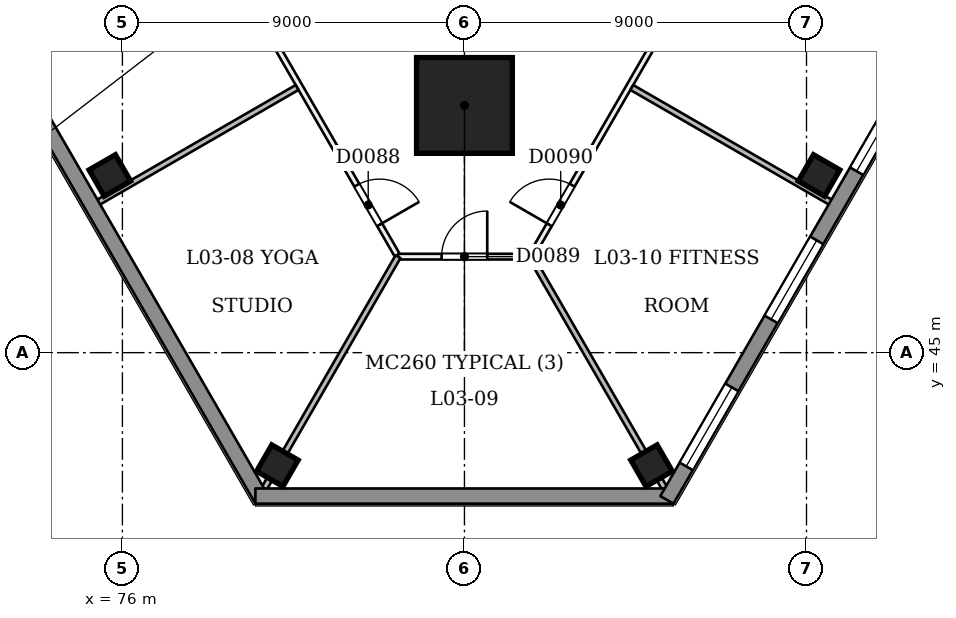
"""IFC4 building model, lengths in metres.
Left out: names, types, materials, properties, quantities, classifications, styles, units other than length and angle.
Written with IfcOpenShell. Run it as: python <this file> out.ifc"""

import sys

from ifc_helpers import new_model, si_unit, direction, frame, frame_2d, origin, origin_2d, place, context, subcontext, project, spatial, rectangle, extrude, element, fill, save


model = new_model("IFC4")
c1 = context("Model", 3, precision=1e-05, world=origin(), true_north=direction((0.0, 1.0)))
c2 = subcontext(c1, "Body", "Model", "MODEL_VIEW")
j1 = project(units=[si_unit("LENGTHUNIT", "METRE"), si_unit("PLANEANGLEUNIT", "RADIAN")], contexts=[c1])
p1 = place(None, origin())
s1 = spatial("IfcSite", under=j1, at=p1, CompositionType="ELEMENT")
p2 = place(p1, origin())
s2 = spatial("IfcBuilding", under=s1, at=p2, CompositionType="ELEMENT")
p3 = place(p2, frame((0.0, 0.0, 18.0)))
s3 = spatial("IfcBuildingStorey", under=s2, at=p3, CompositionType="ELEMENT", Elevation=18.0)
p4 = place(p3, frame((85.0, 51.434, 0.0), z_axis=(0.0, 0.058385473851, 0.998294113197), x_axis=(-1.0, 0.0, 0.0)))
e1 = element("IfcColumn", 1, at=p4, inside=s3, PredefinedType="COLUMN", context=c2, shape_type="SweptSolid", body=[
    extrude(rectangle(XDim=2.52, YDim=2.52, at=origin_2d()), origin(), (0.0, 0.0, 1.0), 4.508),
])
for number, where, z_axis, x_axis in (
    (2, (75.669, 49.662, 0.0), (0.0, 0.0, 1.0), (0.866, 0.5, 0.0)),
    (3, (80.077, 42.026, 0.0), (0.0, 0.0, 1.0), (0.5, 0.866, 0.0)),
    (4, (89.923, 42.026, 0.0), (0.0, 0.0, 1.0), (0.866, 0.5, 0.0)),
    (5, (94.331, 49.662, 0.0), (0.0, 0.0, 1.0), (0.5, 0.866, 0.0)),
):
    element("IfcColumn", number, at=place(p3, frame(where, z_axis=z_axis, x_axis=x_axis)), inside=s3, PredefinedType="COLUMN", context=c2, shape_type="SweptSolid", body=[
        extrude(rectangle(XDim=0.8, YDim=0.8, at=origin_2d()), origin(), (0.0, 0.0, 1.0), 4.5),
    ])
p5 = place(p3, frame((55.57, 95.474, 0.0), z_axis=(0.0, 0.0, 1.0), x_axis=(0.500000085768, -0.866025354266, 0.0)))
e6 = element("IfcWall", 6, at=p5, inside=s3, PredefinedType="PARTITIONING", context=c2, shape_type="SweptSolid", body=[
    extrude(rectangle(XDim=55.365, YDim=0.15, at=frame_2d((27.682, 0.0))), origin(), (0.0, 0.0, 1.0), 3.55),
])
p6 = place(p5, frame((9.082, 0.0, 0.0)))
e7 = element("IfcOpeningElement", 7, at=p6, cuts=e6, PredefinedType="OPENING", context=c2, shape_type="SweptSolid", body=[
    extrude(rectangle(XDim=1.2, YDim=2.1, at=frame_2d((0.6, 1.05))), frame((0.0, 0.085, 0.0), z_axis=(0.0, -1.0, 0.0), x_axis=(1.0, 0.0, 0.0)), (0.0, 0.0, 1.0), 0.171),
])
p7 = place(p5, frame((18.906, 0.0, 0.0)))
e8 = element("IfcOpeningElement", 8, at=p7, cuts=e6, PredefinedType="OPENING", context=c2, shape_type="SweptSolid", body=[
    extrude(rectangle(XDim=0.9, YDim=2.1, at=frame_2d((0.45, 1.05))), frame((0.0, 0.085, 0.0), z_axis=(0.0, -1.0, 0.0), x_axis=(1.0, 0.0, 0.0)), (0.0, 0.0, 1.0), 0.171),
])
p8 = place(p5, frame((21.856, 0.0, 0.0)))
e9 = element("IfcOpeningElement", 9, at=p8, cuts=e6, PredefinedType="OPENING", context=c2, shape_type="SweptSolid", body=[
    extrude(rectangle(XDim=0.9, YDim=2.1, at=frame_2d((0.45, 1.05))), frame((0.0, 0.085, 0.0), z_axis=(0.0, -1.0, 0.0), x_axis=(1.0, 0.0, 0.0)), (0.0, 0.0, 1.0), 0.171),
])
p9 = place(p5, frame((31.582, 0.0, 0.0)))
e10 = element("IfcOpeningElement", 10, at=p9, cuts=e6, PredefinedType="OPENING", context=c2, shape_type="SweptSolid", body=[
    extrude(rectangle(XDim=1.2, YDim=2.1, at=frame_2d((0.6, 1.05))), frame((0.0, 0.085, 0.0), z_axis=(0.0, -1.0, 0.0), x_axis=(1.0, 0.0, 0.0)), (0.0, 0.0, 1.0), 0.171),
])
p10 = place(p5, frame((45.082, 0.0, 0.0)))
e11 = element("IfcOpeningElement", 11, at=p10, cuts=e6, PredefinedType="OPENING", context=c2, shape_type="SweptSolid", body=[
    extrude(rectangle(XDim=1.2, YDim=2.1, at=frame_2d((0.6, 1.05))), frame((0.0, 0.085, 0.0), z_axis=(0.0, -1.0, 0.0), x_axis=(1.0, 0.0, 0.0)), (0.0, 0.0, 1.0), 0.171),
])
p11 = place(p5, frame((53.195, 0.0, 0.0)))
e12 = element("IfcOpeningElement", 12, at=p11, cuts=e6, PredefinedType="OPENING", context=c2, shape_type="SweptSolid", body=[
    extrude(rectangle(XDim=1.2, YDim=2.1, at=frame_2d((0.6, 1.05))), frame((0.0, 0.085, 0.0), z_axis=(0.0, -1.0, 0.0), x_axis=(1.0, 0.0, 0.0)), (0.0, 0.0, 1.0), 0.171),
])
p12 = place(p3, frame((83.253, 47.526, 0.0), z_axis=(0.0, 0.0, 1.0), x_axis=(1.0, 0.0, 0.0)))
e13 = element("IfcWall", 13, at=p12, inside=s3, PredefinedType="PARTITIONING", context=c2, shape_type="SweptSolid", body=[
    extrude(rectangle(XDim=3.495, YDim=0.15, at=frame_2d((1.747, 0.0))), origin(), (0.0, 0.0, 1.0), 4.05),
])
p13 = place(p12, frame((1.147, 0.0, 0.0)))
e14 = element("IfcOpeningElement", 14, at=p13, cuts=e13, PredefinedType="OPENING", context=c2, shape_type="SweptSolid", body=[
    extrude(rectangle(XDim=1.2, YDim=2.1, at=frame_2d((0.6, 1.05))), frame((0.0, 0.085, 0.0), z_axis=(0.0, -1.0, 0.0), x_axis=(1.0, 0.0, 0.0)), (0.0, 0.0, 1.0), 0.171),
])
p14 = place(p3, frame((86.747, 47.526, 0.0), z_axis=(0.0, 0.0, 1.0), x_axis=(0.500000085768, 0.866025354266, 0.0)))
e15 = element("IfcWall", 15, at=p14, inside=s3, PredefinedType="PARTITIONING", context=c2, shape_type="SweptSolid", body=[
    extrude(rectangle(XDim=55.365, YDim=0.15, at=frame_2d((27.682, 0.0))), origin(), (0.0, 0.0, 1.0), 3.55),
])
p15 = place(p14, frame((0.97, 0.0, 0.0)))
e16 = element("IfcOpeningElement", 16, at=p15, cuts=e15, PredefinedType="OPENING", context=c2, shape_type="SweptSolid", body=[
    extrude(rectangle(XDim=1.2, YDim=2.1, at=frame_2d((0.6, 1.05))), frame((0.0, 0.085, 0.0), z_axis=(0.0, -1.0, 0.0), x_axis=(1.0, 0.0, 0.0)), (0.0, 0.0, 1.0), 0.171),
])
p16 = place(p14, frame((11.332, 0.0, 0.0)))
e17 = element("IfcOpeningElement", 17, at=p16, cuts=e15, PredefinedType="OPENING", context=c2, shape_type="SweptSolid", body=[
    extrude(rectangle(XDim=1.2, YDim=2.1, at=frame_2d((0.6, 1.05))), frame((0.0, 0.085, 0.0), z_axis=(0.0, -1.0, 0.0), x_axis=(1.0, 0.0, 0.0)), (0.0, 0.0, 1.0), 0.171),
])
p17 = place(p14, frame((22.582, 0.0, 0.0)))
e18 = element("IfcOpeningElement", 18, at=p17, cuts=e15, PredefinedType="OPENING", context=c2, shape_type="SweptSolid", body=[
    extrude(rectangle(XDim=1.2, YDim=2.1, at=frame_2d((0.6, 1.05))), frame((0.0, 0.085, 0.0), z_axis=(0.0, -1.0, 0.0), x_axis=(1.0, 0.0, 0.0)), (0.0, 0.0, 1.0), 0.171),
])
p18 = place(p14, frame((28.365, 0.0, 0.0)))
e19 = element("IfcOpeningElement", 19, at=p18, cuts=e15, PredefinedType="OPENING", context=c2, shape_type="SweptSolid", body=[
    extrude(rectangle(XDim=1.0, YDim=2.1, at=frame_2d((0.5, 1.05))), frame((0.0, 0.085, 0.0), z_axis=(0.0, -1.0, 0.0), x_axis=(1.0, 0.0, 0.0)), (0.0, 0.0, 1.0), 0.171),
])
p19 = place(p14, frame((30.615, 0.0, 0.0)))
e20 = element("IfcOpeningElement", 20, at=p19, cuts=e15, PredefinedType="OPENING", context=c2, shape_type="SweptSolid", body=[
    extrude(rectangle(XDim=1.0, YDim=2.1, at=frame_2d((0.5, 1.05))), frame((0.0, 0.085, 0.0), z_axis=(0.0, -1.0, 0.0), x_axis=(1.0, 0.0, 0.0)), (0.0, 0.0, 1.0), 0.171),
])
p20 = place(p14, frame((38.332, 0.0, 0.0)))
e21 = element("IfcOpeningElement", 21, at=p20, cuts=e15, PredefinedType="OPENING", context=c2, shape_type="SweptSolid", body=[
    extrude(rectangle(XDim=1.2, YDim=2.1, at=frame_2d((0.6, 1.05))), frame((0.0, 0.085, 0.0), z_axis=(0.0, -1.0, 0.0), x_axis=(1.0, 0.0, 0.0)), (0.0, 0.0, 1.0), 0.171),
])
p21 = place(p14, frame((49.582, 0.0, 0.0)))
e22 = element("IfcOpeningElement", 22, at=p21, cuts=e15, PredefinedType="OPENING", context=c2, shape_type="SweptSolid", body=[
    extrude(rectangle(XDim=1.2, YDim=2.1, at=frame_2d((0.6, 1.05))), frame((0.0, 0.085, 0.0), z_axis=(0.0, -1.0, 0.0), x_axis=(1.0, 0.0, 0.0)), (0.0, 0.0, 1.0), 0.171),
])
p22 = place(p3, frame((75.119, 48.814, 0.0), z_axis=(0.0, 0.0, 1.0), x_axis=(0.866025537322, 0.499999768706, 0.0)))
e23 = element("IfcWall", 23, at=p22, inside=s3, PredefinedType="PARTITIONING", context=c2, shape_type="SweptSolid", body=[
    extrude(rectangle(XDim=6.325, YDim=0.15, at=frame_2d((3.163, 0.0))), origin(), (0.0, 0.0, 1.0), 4.05),
])
for number, where, z_axis, x_axis in (
    (24, (79.558, 41.126, 0.0), (0.0, 0.0, 1.0), (0.5, 0.866, 0.0)),
    (25, (90.442, 41.126, 0.0), (0.0, 0.0, 1.0), (-0.5, 0.866, 0.0)),
):
    element("IfcWall", number, at=place(p3, frame(where, z_axis=z_axis, x_axis=x_axis)), inside=s3, PredefinedType="PARTITIONING", context=c2, shape_type="SweptSolid", body=[
        extrude(rectangle(XDim=7.39, YDim=0.15, at=frame_2d((3.695, 0.0))), origin(), (0.0, 0.0, 1.0), 4.05),
    ])
p23 = place(p3, frame((94.881, 48.814, 0.0), z_axis=(0.0, 0.0, 1.0), x_axis=(-0.866042250622, 0.499970819286, 0.0)))
e26 = element("IfcWall", 26, at=p23, inside=s3, PredefinedType="PARTITIONING", context=c2, shape_type="SweptSolid", body=[
    extrude(rectangle(XDim=6.325, YDim=0.15, at=frame_2d((3.163, 0.0))), origin(), (0.0, 0.0, 1.0), 4.05),
])
p24 = place(p3, frame((79.673, 41.126, 0.0), z_axis=(0.0, 0.0, 1.0), x_axis=(-0.499997306052, 0.866026959131, 0.0)))
e27 = element("IfcWall", 27, at=p24, inside=s3, PredefinedType="SOLIDWALL", context=c2, shape_type="SweptSolid", body=[
    extrude(rectangle(XDim=62.87, YDim=0.4, at=frame_2d((31.435, 0.0))), origin(), (0.0, 0.0, 1.0), 3.55),
])
p25 = place(p24, frame((54.986, 0.0, 0.9)))
e28 = element("IfcOpeningElement", 28, at=p25, cuts=e27, PredefinedType="OPENING", context=c2, shape_type="SweptSolid", body=[
    extrude(rectangle(XDim=2.4, YDim=1.5, at=frame_2d((1.2, 0.75))), frame((0.0, 0.21, 0.0), z_axis=(0.0, -1.0, 0.0), x_axis=(1.0, 0.0, 0.0)), (0.0, 0.0, 1.0), 0.421),
])
p26 = place(p24, frame((50.486, 0.0, 0.9)))
e29 = element("IfcOpeningElement", 29, at=p26, cuts=e27, PredefinedType="OPENING", context=c2, shape_type="SweptSolid", body=[
    extrude(rectangle(XDim=2.4, YDim=1.5, at=frame_2d((1.2, 0.75))), frame((0.0, 0.21, 0.0), z_axis=(0.0, -1.0, 0.0), x_axis=(1.0, 0.0, 0.0)), (0.0, 0.0, 1.0), 0.421),
])
p27 = place(p24, frame((45.986, 0.0, 0.9)))
e30 = element("IfcOpeningElement", 30, at=p27, cuts=e27, PredefinedType="OPENING", context=c2, shape_type="SweptSolid", body=[
    extrude(rectangle(XDim=2.4, YDim=1.5, at=frame_2d((1.2, 0.75))), frame((0.0, 0.21, 0.0), z_axis=(0.0, -1.0, 0.0), x_axis=(1.0, 0.0, 0.0)), (0.0, 0.0, 1.0), 0.421),
])
p28 = place(p24, frame((32.486, 0.0, 0.9)))
e31 = element("IfcOpeningElement", 31, at=p28, cuts=e27, PredefinedType="OPENING", context=c2, shape_type="SweptSolid", body=[
    extrude(rectangle(XDim=2.4, YDim=1.5, at=frame_2d((1.2, 0.75))), frame((0.0, 0.21, 0.0), z_axis=(0.0, -1.0, 0.0), x_axis=(1.0, 0.0, 0.0)), (0.0, 0.0, 1.0), 0.421),
])
p29 = place(p24, frame((27.986, 0.0, 0.9)))
e32 = element("IfcOpeningElement", 32, at=p29, cuts=e27, PredefinedType="OPENING", context=c2, shape_type="SweptSolid", body=[
    extrude(rectangle(XDim=2.4, YDim=1.5, at=frame_2d((1.2, 0.75))), frame((0.0, 0.21, 0.0), z_axis=(0.0, -1.0, 0.0), x_axis=(1.0, 0.0, 0.0)), (0.0, 0.0, 1.0), 0.421),
])
p30 = place(p24, frame((23.486, 0.0, 0.9)))
e33 = element("IfcOpeningElement", 33, at=p30, cuts=e27, PredefinedType="OPENING", context=c2, shape_type="SweptSolid", body=[
    extrude(rectangle(XDim=2.4, YDim=1.5, at=frame_2d((1.2, 0.75))), frame((0.0, 0.21, 0.0), z_axis=(0.0, -1.0, 0.0), x_axis=(1.0, 0.0, 0.0)), (0.0, 0.0, 1.0), 0.421),
])
p31 = place(p24, frame((18.986, 0.0, 0.9)))
e34 = element("IfcOpeningElement", 34, at=p31, cuts=e27, PredefinedType="OPENING", context=c2, shape_type="SweptSolid", body=[
    extrude(rectangle(XDim=2.4, YDim=1.5, at=frame_2d((1.2, 0.75))), frame((0.0, 0.21, 0.0), z_axis=(0.0, -1.0, 0.0), x_axis=(1.0, 0.0, 0.0)), (0.0, 0.0, 1.0), 0.421),
])
p32 = place(p24, frame((14.486, 0.0, 0.9)))
e35 = element("IfcOpeningElement", 35, at=p32, cuts=e27, PredefinedType="OPENING", context=c2, shape_type="SweptSolid", body=[
    extrude(rectangle(XDim=2.4, YDim=1.5, at=frame_2d((1.2, 0.75))), frame((0.0, 0.21, 0.0), z_axis=(0.0, -1.0, 0.0), x_axis=(1.0, 0.0, 0.0)), (0.0, 0.0, 1.0), 0.421),
])
p33 = place(p3, frame((90.5, 41.226, 0.0), z_axis=(0.0, 0.0, 1.0), x_axis=(-1.0, 0.0, 0.0)))
e36 = element("IfcWall", 36, at=p33, inside=s3, PredefinedType="SOLIDWALL", context=c2, shape_type="SweptSolid", body=[
    extrude(rectangle(XDim=11.0, YDim=0.4, at=frame_2d((5.5, 0.0))), origin(), (0.0, 0.0, 1.0), 3.55),
])
p34 = place(p3, frame((121.762, 95.574, 0.0), z_axis=(0.0, 0.0, 1.0), x_axis=(-0.499997306052, -0.866026959131, 0.0)))
e37 = element("IfcWall", 37, at=p34, inside=s3, PredefinedType="SOLIDWALL", context=c2, shape_type="SweptSolid", body=[
    extrude(rectangle(XDim=62.87, YDim=0.4, at=frame_2d((31.435, 0.0))), origin(), (0.0, 0.0, 1.0), 3.55),
])
p35 = place(p34, frame((59.452, 0.0, 0.9)))
e38 = element("IfcOpeningElement", 38, at=p35, cuts=e37, PredefinedType="OPENING", context=c2, shape_type="SweptSolid", body=[
    extrude(rectangle(XDim=2.4, YDim=1.5, at=frame_2d((1.2, 0.75))), frame((0.0, 0.21, 0.0), z_axis=(0.0, -1.0, 0.0), x_axis=(1.0, 0.0, 0.0)), (0.0, 0.0, 1.0), 0.421),
])
p36 = place(p34, frame((54.986, 0.0, 0.9)))
e39 = element("IfcOpeningElement", 39, at=p36, cuts=e37, PredefinedType="OPENING", context=c2, shape_type="SweptSolid", body=[
    extrude(rectangle(XDim=2.4, YDim=1.5, at=frame_2d((1.2, 0.75))), frame((0.0, 0.21, 0.0), z_axis=(0.0, -1.0, 0.0), x_axis=(1.0, 0.0, 0.0)), (0.0, 0.0, 1.0), 0.421),
])
p37 = place(p34, frame((50.486, 0.0, 0.9)))
e40 = element("IfcOpeningElement", 40, at=p37, cuts=e37, PredefinedType="OPENING", context=c2, shape_type="SweptSolid", body=[
    extrude(rectangle(XDim=2.4, YDim=1.5, at=frame_2d((1.2, 0.75))), frame((0.0, 0.21, 0.0), z_axis=(0.0, -1.0, 0.0), x_axis=(1.0, 0.0, 0.0)), (0.0, 0.0, 1.0), 0.421),
])
p38 = place(p34, frame((45.986, 0.0, 0.9)))
e41 = element("IfcOpeningElement", 41, at=p38, cuts=e37, PredefinedType="OPENING", context=c2, shape_type="SweptSolid", body=[
    extrude(rectangle(XDim=2.4, YDim=1.5, at=frame_2d((1.2, 0.75))), frame((0.0, 0.21, 0.0), z_axis=(0.0, -1.0, 0.0), x_axis=(1.0, 0.0, 0.0)), (0.0, 0.0, 1.0), 0.421),
])
p39 = place(p34, frame((41.486, 0.0, 0.9)))
e42 = element("IfcOpeningElement", 42, at=p39, cuts=e37, PredefinedType="OPENING", context=c2, shape_type="SweptSolid", body=[
    extrude(rectangle(XDim=2.4, YDim=1.5, at=frame_2d((1.2, 0.75))), frame((0.0, 0.21, 0.0), z_axis=(0.0, -1.0, 0.0), x_axis=(1.0, 0.0, 0.0)), (0.0, 0.0, 1.0), 0.421),
])
p40 = place(p34, frame((36.986, 0.0, 0.9)))
e43 = element("IfcOpeningElement", 43, at=p40, cuts=e37, PredefinedType="OPENING", context=c2, shape_type="SweptSolid", body=[
    extrude(rectangle(XDim=2.4, YDim=1.5, at=frame_2d((1.2, 0.75))), frame((0.0, 0.21, 0.0), z_axis=(0.0, -1.0, 0.0), x_axis=(1.0, 0.0, 0.0)), (0.0, 0.0, 1.0), 0.421),
])
p41 = place(p34, frame((23.486, 0.0, 0.9)))
e44 = element("IfcOpeningElement", 44, at=p41, cuts=e37, PredefinedType="OPENING", context=c2, shape_type="SweptSolid", body=[
    extrude(rectangle(XDim=2.4, YDim=1.5, at=frame_2d((1.2, 0.75))), frame((0.0, 0.21, 0.0), z_axis=(0.0, -1.0, 0.0), x_axis=(1.0, 0.0, 0.0)), (0.0, 0.0, 1.0), 0.421),
])
p42 = place(p34, frame((18.986, 0.0, 0.9)))
e45 = element("IfcOpeningElement", 45, at=p42, cuts=e37, PredefinedType="OPENING", context=c2, shape_type="SweptSolid", body=[
    extrude(rectangle(XDim=2.4, YDim=1.5, at=frame_2d((1.2, 0.75))), frame((0.0, 0.21, 0.0), z_axis=(0.0, -1.0, 0.0), x_axis=(1.0, 0.0, 0.0)), (0.0, 0.0, 1.0), 0.421),
])
p43 = place(p34, frame((14.486, 0.0, 0.9)))
e46 = element("IfcOpeningElement", 46, at=p43, cuts=e37, PredefinedType="OPENING", context=c2, shape_type="SweptSolid", body=[
    extrude(rectangle(XDim=2.4, YDim=1.5, at=frame_2d((1.2, 0.75))), frame((0.0, 0.21, 0.0), z_axis=(0.0, -1.0, 0.0), x_axis=(1.0, 0.0, 0.0)), (0.0, 0.0, 1.0), 0.421),
])
p44 = place(p34, frame((5.486, 0.0, 0.9)))
e47 = element("IfcOpeningElement", 47, at=p44, cuts=e37, PredefinedType="OPENING", context=c2, shape_type="SweptSolid", body=[
    extrude(rectangle(XDim=2.4, YDim=1.5, at=frame_2d((1.2, 0.75))), frame((0.0, 0.21, 0.0), z_axis=(0.0, -1.0, 0.0), x_axis=(1.0, 0.0, 0.0)), (0.0, 0.0, 1.0), 0.421),
])
p45 = place(p34, frame((1.018, 0.0, 0.9)))
e48 = element("IfcOpeningElement", 48, at=p45, cuts=e37, PredefinedType="OPENING", context=c2, shape_type="SweptSolid", body=[
    extrude(rectangle(XDim=2.4, YDim=1.5, at=frame_2d((1.2, 0.75))), frame((0.0, 0.21, 0.0), z_axis=(0.0, -1.0, 0.0), x_axis=(1.0, 0.0, 0.0)), (0.0, 0.0, 1.0), 0.421),
])
p46 = place(p11, origin())
e49 = element("IfcDoor", 49, at=p46, inside=s3, OperationType="SINGLE_SWING_RIGHT", PredefinedType="NOTDEFINED", context=c2, shape_type="SweptSolid", body=[
    extrude(rectangle(XDim=1.2, YDim=2.1, at=frame_2d((0.6, 1.05))), frame((0.0, 0.025, 0.0), z_axis=(0.0, -1.0, 0.0), x_axis=(1.0, 0.0, 0.0)), (0.0, 0.0, 1.0), 0.05),
])
fill(e12, e49)
p47 = place(p13, origin())
e50 = element("IfcDoor", 50, at=p47, inside=s3, OperationType="SINGLE_SWING_RIGHT", PredefinedType="NOTDEFINED", context=c2, shape_type="SweptSolid", body=[
    extrude(rectangle(XDim=1.2, YDim=2.1, at=frame_2d((0.6, 1.05))), frame((0.0, 0.025, 0.0), z_axis=(0.0, -1.0, 0.0), x_axis=(1.0, 0.0, 0.0)), (0.0, 0.0, 1.0), 0.05),
])
fill(e14, e50)
p48 = place(p15, origin())
e51 = element("IfcDoor", 51, at=p48, inside=s3, OperationType="SINGLE_SWING_LEFT", PredefinedType="NOTDEFINED", context=c2, shape_type="SweptSolid", body=[
    extrude(rectangle(XDim=1.2, YDim=2.1, at=frame_2d((0.6, 1.05))), frame((0.0, 0.025, 0.0), z_axis=(0.0, -1.0, 0.0), x_axis=(1.0, 0.0, 0.0)), (0.0, 0.0, 1.0), 0.05),
])
fill(e16, e51)
p49 = place(p35, origin())
e52 = element("IfcWindow", 52, at=p49, inside=s3, PartitioningType="SINGLE_PANEL", PredefinedType="WINDOW", context=c2, shape_type="SweptSolid", body=[
    extrude(rectangle(XDim=2.4, YDim=1.5, at=frame_2d((1.2, 0.75))), frame((0.0, 0.03, 0.0), z_axis=(0.0, -1.0, 0.0), x_axis=(1.0, 0.0, 0.0)), (0.0, 0.0, 1.0), 0.06),
])
fill(e38, e52)
p50 = place(p36, origin())
e53 = element("IfcWindow", 53, at=p50, inside=s3, PartitioningType="SINGLE_PANEL", PredefinedType="WINDOW", context=c2, shape_type="SweptSolid", body=[
    extrude(rectangle(XDim=2.4, YDim=1.5, at=frame_2d((1.2, 0.75))), frame((0.0, 0.03, 0.0), z_axis=(0.0, -1.0, 0.0), x_axis=(1.0, 0.0, 0.0)), (0.0, 0.0, 1.0), 0.06),
])
fill(e39, e53)
p51 = place(p37, origin())
e54 = element("IfcWindow", 54, at=p51, inside=s3, PartitioningType="SINGLE_PANEL", PredefinedType="WINDOW", context=c2, shape_type="SweptSolid", body=[
    extrude(rectangle(XDim=2.4, YDim=1.5, at=frame_2d((1.2, 0.75))), frame((0.0, 0.03, 0.0), z_axis=(0.0, -1.0, 0.0), x_axis=(1.0, 0.0, 0.0)), (0.0, 0.0, 1.0), 0.06),
])
fill(e40, e54)
save(model, sys.argv[1])
